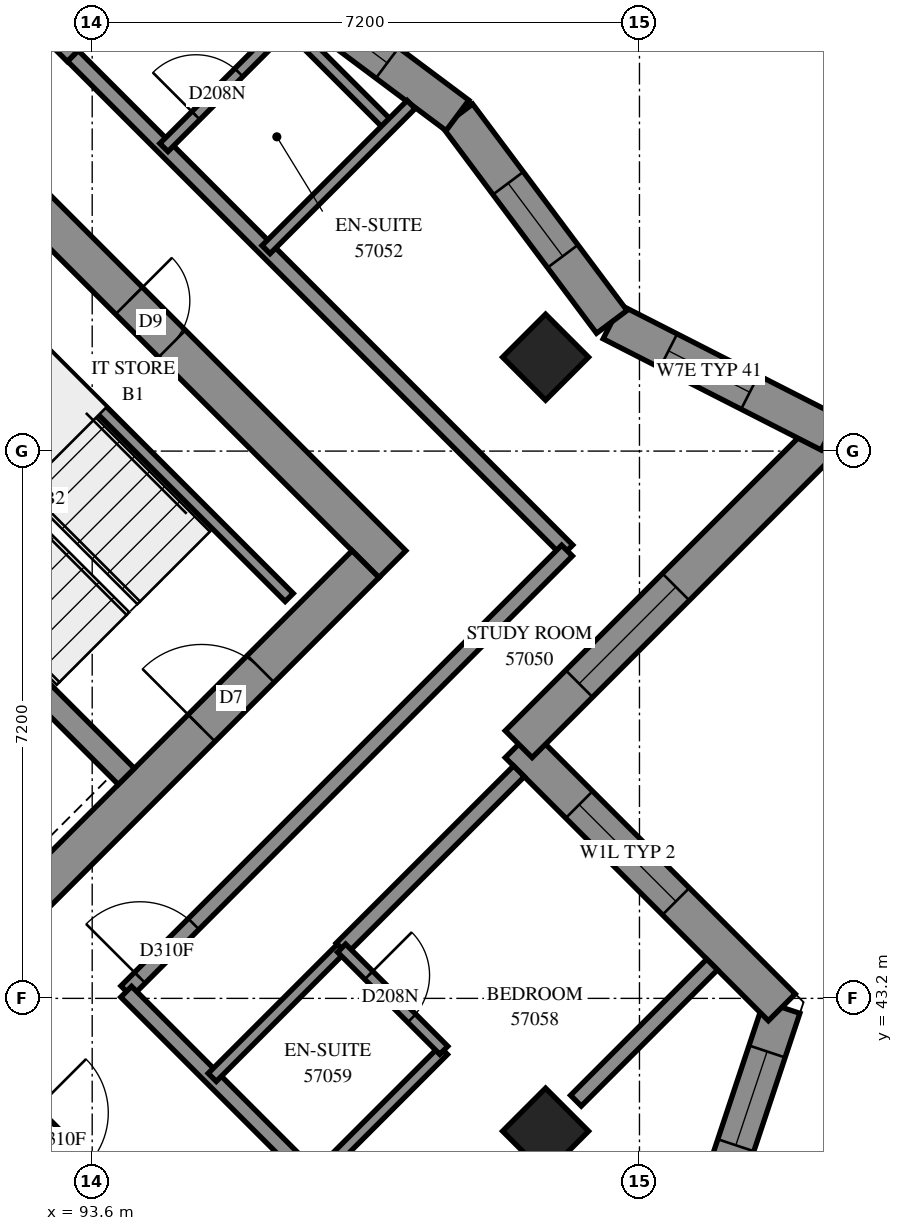
"""IFC4 building model, lengths in metres.
Left out: names, types, materials, properties, quantities, classifications, styles, units other than length and angle.
Written with IfcOpenShell. Run it as: python <this file> out.ifc"""

import sys

from ifc_helpers import new_model, si_unit, direction, frame, frame_2d, origin, origin_2d, place, context, subcontext, project, spatial, polyline, rectangle, outline, extrude, element, fill, save


model = new_model("IFC4")
c1 = context("Model", 3, precision=1e-05, world=origin(), true_north=direction((0.0, 1.0)))
c2 = subcontext(c1, "Body", "Model", "MODEL_VIEW")
j1 = project(units=[si_unit("LENGTHUNIT", "METRE"), si_unit("PLANEANGLEUNIT", "RADIAN")], contexts=[c1])
p1 = place(None, origin())
s1 = spatial("IfcSite", under=j1, at=p1, CompositionType="ELEMENT")
p2 = place(p1, origin())
s2 = spatial("IfcBuilding", under=s1, at=p2, CompositionType="ELEMENT")
p3 = place(p2, frame((0.0, 0.0, 210.0)))
s3 = spatial("IfcBuildingStorey", under=s2, at=p3, CompositionType="ELEMENT", Elevation=210.0)
for number, where, z_axis, x_axis in (
    (1, (99.565, 51.635, 0.0), (0.0, 0.0, 1.0), (0.707, -0.707, 0.0)),
    (2, (99.565, 41.453, 0.0), (0.0, 0.0, 1.0), (0.707, -0.707, 0.0)),
):
    element("IfcColumn", number, at=place(p3, frame(where, z_axis=z_axis, x_axis=x_axis)), inside=s3, PredefinedType="COLUMN", context=c2, shape_type="SweptSolid", body=[
        extrude(rectangle(XDim=0.8, YDim=0.8, at=origin_2d()), origin(), (0.0, 0.0, 1.0), 3.1),
    ])
p4 = place(p3, frame((86.66, 59.802, -0.3), z_axis=(0.0, 0.0, 1.0), x_axis=(0.7071067812, -0.7071067812, 0.0)))
e3 = element("IfcWall", 3, at=p4, inside=s3, PredefinedType="SHEAR", context=c2, shape_type="SweptSolid", body=[
    extrude(rectangle(XDim=15.4, YDim=0.5, at=frame_2d((7.7, 0.0))), origin(), (0.0, 0.0, 1.0), 2.7),
])
p5 = place(p4, frame((10.5, 0.0, 0.3)))
e4 = element("IfcOpeningElement", 4, at=p5, cuts=e3, PredefinedType="OPENING", context=c2, shape_type="SweptSolid", body=[
    extrude(rectangle(XDim=0.8, YDim=2.1, at=frame_2d((0.4, 1.05))), frame((0.0, 0.26, 0.0), z_axis=(0.0, -1.0, 0.0), x_axis=(1.0, 0.0, 0.0)), (0.0, 0.0, 1.0), 0.52),
])
p6 = place(p3, frame((87.013, 38.731, -0.3), z_axis=(0.0, 0.0, 1.0), x_axis=(0.7071067812, 0.7071067812, 0.0)))
e5 = element("IfcWall", 5, at=p6, inside=s3, PredefinedType="SHEAR", context=c2, shape_type="SweptSolid", body=[
    extrude(rectangle(XDim=14.4, YDim=0.5, at=frame_2d((7.2, 0.0))), origin(), (0.0, 0.0, 1.0), 2.7),
])
p7 = place(p6, frame((4.55, 0.0, 0.3)))
e6 = element("IfcOpeningElement", 6, at=p7, cuts=e5, PredefinedType="OPENING", context=c2, shape_type="SweptSolid", body=[
    extrude(rectangle(XDim=1.1, YDim=2.1, at=frame_2d((0.55, 1.05))), frame((0.0, 0.26, 0.0), z_axis=(0.0, -1.0, 0.0), x_axis=(1.0, 0.0, 0.0)), (0.0, 0.0, 1.0), 0.52),
])
p8 = place(p6, frame((11.35, 0.0, 0.3)))
e7 = element("IfcOpeningElement", 7, at=p8, cuts=e5, PredefinedType="OPENING", context=c2, shape_type="SweptSolid", body=[
    extrude(rectangle(XDim=1.1, YDim=2.1, at=frame_2d((0.55, 1.05))), frame((0.0, 0.26, 0.0), z_axis=(0.0, -1.0, 0.0), x_axis=(1.0, 0.0, 0.0)), (0.0, 0.0, 1.0), 0.52),
])
p9 = place(p3, frame((88.958, 51.211, 0.0), z_axis=(0.0, 0.0, 1.0), x_axis=(0.7070998367, -0.7071137256, 0.0)))
e8 = element("IfcWall", 8, at=p9, inside=s3, PredefinedType="SOLIDWALL", context=c2, shape_type="SweptSolid", body=[
    extrude(rectangle(XDim=7.2, YDim=0.3, at=frame_2d((3.6, 0.0))), origin(), (0.0, 0.0, 1.0), 3.1),
])
p10 = place(p3, frame((101.062, 38.252, 0.0), z_axis=(0.0, 0.0, 1.0), x_axis=(0.3162395484, 0.9486793705, 0.0)))
e9 = element("IfcWall", 9, at=p10, inside=s3, PredefinedType="SOLIDWALL", context=c2, shape_type="SweptSolid", body=[
    extrude(outline(polyline([(-0.12, -0.25), (5.247, -0.25), (4.938, 0.25), (0.12, 0.25), (-0.12, -0.25)])), origin(), (0.0, 0.0, 1.0), 3.1),
])
p11 = place(p10, frame((1.68, 0.0, 0.45)))
e10 = element("IfcOpeningElement", 10, at=p11, cuts=e9, PredefinedType="OPENING", context=c2, shape_type="SweptSolid", body=[
    extrude(rectangle(XDim=1.3, YDim=2.5, at=frame_2d((0.65, 1.25))), frame((0.0, 0.26, 0.0), z_axis=(0.0, -1.0, 0.0), x_axis=(1.0, 0.0, 0.0)), (0.0, 0.0, 1.0), 0.52),
])
p12 = place(p10, frame((3.18, 0.0, 0.45)))
e11 = element("IfcOpeningElement", 11, at=p12, cuts=e9, PredefinedType="OPENING", context=c2, shape_type="SweptSolid", body=[
    extrude(rectangle(XDim=1.3, YDim=2.5, at=frame_2d((0.65, 1.25))), frame((0.0, 0.26, 0.0), z_axis=(0.0, -1.0, 0.0), x_axis=(1.0, 0.0, 0.0)), (0.0, 0.0, 1.0), 0.52),
])
p13 = place(p3, frame((102.673, 43.083, 0.0), z_axis=(0.0, 0.0, 1.0), x_axis=(-0.7071067812, 0.7071067812, 0.0)))
e12 = element("IfcWall", 12, at=p13, inside=s3, PredefinedType="SOLIDWALL", context=c2, shape_type="SweptSolid", body=[
    extrude(outline(polyline([(-0.154, -0.25), (4.646, -0.25), (5.146, 0.25), (0.154, 0.25), (-0.154, -0.25)])), origin(), (0.0, 0.0, 1.0), 3.1),
])
p14 = place(p13, frame((1.97, 0.0, 0.6)))
e13 = element("IfcOpeningElement", 13, at=p14, cuts=e12, PredefinedType="OPENING", context=c2, shape_type="SweptSolid", body=[
    extrude(rectangle(XDim=1.8, YDim=1.9, at=frame_2d((0.9, 0.95))), frame((0.0, 0.26, 0.0), z_axis=(0.0, -1.0, 0.0), x_axis=(1.0, 0.0, 0.0)), (0.0, 0.0, 1.0), 0.52),
])
p15 = place(p3, frame((99.211, 46.544, 0.0), z_axis=(0.0, 0.0, 1.0), x_axis=(0.7071067812, 0.7071067812, 0.0)))
e14 = element("IfcWall", 14, at=p15, inside=s3, PredefinedType="SOLIDWALL", context=c2, shape_type="SweptSolid", body=[
    extrude(outline(polyline([(0.25, -0.25), (6.132, -0.25), (5.444, 0.25), (-0.25, 0.25), (0.25, -0.25)])), origin(), (0.0, 0.0, 1.0), 3.1),
])
p16 = place(p15, frame((1.125, 0.0, 0.6)))
e15 = element("IfcOpeningElement", 15, at=p16, cuts=e14, PredefinedType="OPENING", context=c2, shape_type="SweptSolid", body=[
    extrude(rectangle(XDim=1.8, YDim=1.9, at=frame_2d((0.9, 0.95))), frame((0.0, 0.26, 0.0), z_axis=(0.0, -1.0, 0.0), x_axis=(1.0, 0.0, 0.0)), (0.0, 0.0, 1.0), 0.52),
])
p17 = place(p3, frame((103.304, 50.637, 0.0), z_axis=(0.0, 0.0, 1.0), x_axis=(-0.8908334453, 0.4543300262, 0.0)))
e16 = element("IfcWall", 16, at=p17, inside=s3, PredefinedType="SOLIDWALL", context=c2, shape_type="SweptSolid", body=[
    extrude(outline(polyline([(-0.344, -0.25), (3.162, -0.25), (3.278, 0.25), (0.344, 0.25), (-0.344, -0.25)])), origin(), (0.0, 0.0, 1.0), 3.1),
])
p18 = place(p17, frame((1.182, 0.0, 0.45)))
e17 = element("IfcOpeningElement", 17, at=p18, cuts=e16, PredefinedType="OPENING", context=c2, shape_type="SweptSolid", body=[
    extrude(rectangle(XDim=1.2, YDim=2.5, at=frame_2d((0.6, 1.25))), frame((0.0, 0.26, 0.0), z_axis=(0.0, -1.0, 0.0), x_axis=(1.0, 0.0, 0.0)), (0.0, 0.0, 1.0), 0.52),
])
p19 = place(p3, frame((100.436, 52.1, 0.0), z_axis=(0.0, 0.0, 1.0), x_axis=(-0.5986733779, 0.8009932501, 0.0)))
e18 = element("IfcWall", 18, at=p19, inside=s3, PredefinedType="SOLIDWALL", context=c2, shape_type="SweptSolid", body=[
    extrude(outline(polyline([(0.058, -0.25), (3.427, -0.25), (3.355, 0.25), (-0.058, 0.25), (0.058, -0.25)])), origin(), (0.0, 0.0, 1.0), 3.1),
])
p20 = place(p19, frame((1.077, 0.0, 0.45)))
e19 = element("IfcOpeningElement", 19, at=p20, cuts=e18, PredefinedType="OPENING", context=c2, shape_type="SweptSolid", body=[
    extrude(rectangle(XDim=1.2, YDim=2.5, at=frame_2d((0.6, 1.25))), frame((0.0, 0.26, 0.0), z_axis=(0.0, -1.0, 0.0), x_axis=(1.0, 0.0, 0.0)), (0.0, 0.0, 1.0), 0.52),
])
p21 = place(p3, frame((98.405, 54.816, 0.0), z_axis=(0.0, 0.0, 1.0), x_axis=(-0.8009854957, 0.5986837527, 0.0)))
e20 = element("IfcWall", 20, at=p21, inside=s3, PredefinedType="SOLIDWALL", context=c2, shape_type="SweptSolid", body=[
    extrude(outline(polyline([(-0.036, -0.25), (3.333, -0.25), (3.405, 0.25), (0.036, 0.25), (-0.036, -0.25)])), origin(), (0.0, 0.0, 1.0), 3.1),
])
p22 = place(p21, frame((1.153, 0.0, 0.45)))
e21 = element("IfcOpeningElement", 21, at=p22, cuts=e20, PredefinedType="OPENING", context=c2, shape_type="SweptSolid", body=[
    extrude(rectangle(XDim=1.2, YDim=2.5, at=frame_2d((0.6, 1.25))), frame((0.0, 0.26, 0.0), z_axis=(0.0, -1.0, 0.0), x_axis=(1.0, 0.0, 0.0)), (0.0, 0.0, 1.0), 0.52),
])
p23 = place(p3, frame((91.313, 53.354, 0.0), z_axis=(0.0, 0.0, 1.0), x_axis=(0.7071140275, -0.7070995348, 0.0)))
e22 = element("IfcWall", 22, at=p23, inside=s3, PredefinedType="PARTITIONING", context=c2, shape_type="SweptSolid", body=[
    extrude(rectangle(XDim=6.9, YDim=0.15, at=frame_2d((3.45, 0.0))), origin(), (0.0, 0.0, 1.0), 3.1),
])
p24 = place(p3, frame((93.346, 55.599, 0.0), z_axis=(0.0, 0.0, 1.0), x_axis=(0.7071067812, -0.7071067812, 0.0)))
e23 = element("IfcWall", 23, at=p24, inside=s3, PredefinedType="PARTITIONING", context=c2, shape_type="SweptSolid", body=[
    extrude(rectangle(XDim=9.201, YDim=0.2, at=frame_2d((4.601, 0.0))), origin(), (0.0, 0.0, 1.0), 3.1),
])
p25 = place(p3, frame((94.049, 43.293, 0.0), z_axis=(0.0, 0.0, 1.0), x_axis=(0.7071067812, 0.7071067812, 0.0)))
e24 = element("IfcWall", 24, at=p25, inside=s3, PredefinedType="PARTITIONING", context=c2, shape_type="SweptSolid", body=[
    extrude(rectangle(XDim=8.2, YDim=0.2, at=frame_2d((4.1, 0.0))), origin(), (0.0, 0.0, 1.0), 3.1),
])
p26 = place(p25, frame((0.252, 0.0, 0.0)))
e25 = element("IfcOpeningElement", 25, at=p26, cuts=e24, PredefinedType="OPENING", context=c2, shape_type="SweptSolid", body=[
    extrude(rectangle(XDim=1.0, YDim=2.1, at=frame_2d((0.5, 1.05))), frame((0.0, 0.11, 0.0), z_axis=(0.0, -1.0, 0.0), x_axis=(1.0, 0.0, 0.0)), (0.0, 0.0, 1.0), 0.22),
])
p27 = place(p3, frame((94.047, 43.287, 0.0), z_axis=(0.0, 0.0, 1.0), x_axis=(0.7071067812, -0.7071067812, 0.0)))
e26 = element("IfcWall", 26, at=p27, inside=s3, PredefinedType="PARTITIONING", context=c2, shape_type="SweptSolid", body=[
    extrude(rectangle(XDim=5.199, YDim=0.2, at=frame_2d((2.599, 0.0))), origin(), (0.0, 0.0, 1.0), 3.1),
])
p28 = place(p27, frame((3.898, 0.0, 0.0)))
e27 = element("IfcOpeningElement", 27, at=p28, cuts=e26, PredefinedType="OPENING", context=c2, shape_type="SweptSolid", body=[
    extrude(rectangle(XDim=0.9, YDim=2.1, at=frame_2d((0.45, 1.05))), frame((0.0, 0.11, 0.0), z_axis=(0.0, -1.0, 0.0), x_axis=(1.0, 0.0, 0.0)), (0.0, 0.0, 1.0), 0.22),
])
p29 = place(p3, frame((92.633, 41.873, 0.0), z_axis=(0.0, 0.0, 1.0), x_axis=(0.7071067812, -0.7071067812, 0.0)))
e28 = element("IfcWall", 28, at=p29, inside=s3, PredefinedType="PARTITIONING", context=c2, shape_type="SweptSolid", body=[
    extrude(rectangle(XDim=5.199, YDim=0.2, at=frame_2d((2.599, 0.0))), origin(), (0.0, 0.0, 1.0), 3.1),
])
p30 = place(p29, frame((0.253, 0.0, 0.0)))
e29 = element("IfcOpeningElement", 29, at=p30, cuts=e28, PredefinedType="OPENING", context=c2, shape_type="SweptSolid", body=[
    extrude(rectangle(XDim=1.0, YDim=2.1, at=frame_2d((0.5, 1.05))), frame((0.0, 0.11, 0.0), z_axis=(0.0, -1.0, 0.0), x_axis=(1.0, 0.0, 0.0)), (0.0, 0.0, 1.0), 0.22),
])
p31 = place(p29, frame((3.948, 0.0, 0.0)))
e30 = element("IfcOpeningElement", 30, at=p31, cuts=e28, PredefinedType="OPENING", context=c2, shape_type="SweptSolid", body=[
    extrude(rectangle(XDim=0.9, YDim=2.1, at=frame_2d((0.45, 1.05))), frame((0.0, 0.11, 0.0), z_axis=(0.0, -1.0, 0.0), x_axis=(1.0, 0.0, 0.0)), (0.0, 0.0, 1.0), 0.22),
])
p32 = place(p3, frame((96.88, 43.856, 0.0), z_axis=(0.0, 0.0, 1.0), x_axis=(0.7074098182, 0.7068036142, 0.0)))
e31 = element("IfcWall", 31, at=p32, inside=s3, PredefinedType="PARTITIONING", context=c2, shape_type="SweptSolid", body=[
    extrude(rectangle(XDim=3.299, YDim=0.2, at=frame_2d((1.65, 0.0))), origin(), (0.0, 0.0, 1.0), 3.1),
])
p33 = place(p3, frame((95.567, 56.617, 0.0), z_axis=(0.0, 0.0, 1.0), x_axis=(0.7071249683, -0.7070885936, 0.0)))
e32 = element("IfcWall", 32, at=p33, inside=s3, PredefinedType="PARTITIONING", context=c2, shape_type="SweptSolid", body=[
    extrude(rectangle(XDim=2.749, YDim=0.15, at=frame_2d((1.375, 0.0))), origin(), (0.0, 0.0, 1.0), 3.1),
])
p34 = place(p3, frame((95.887, 53.051, 0.0), z_axis=(0.0, 0.0, 1.0), x_axis=(0.7070882582, 0.7071253037, 0.0)))
e33 = element("IfcWall", 33, at=p34, inside=s3, PredefinedType="PARTITIONING", context=c2, shape_type="SweptSolid", body=[
    extrude(rectangle(XDim=2.699, YDim=0.15, at=frame_2d((1.35, 0.0))), origin(), (0.0, 0.0, 1.0), 3.1),
])
p35 = place(p3, frame((99.964, 41.854, 0.0), z_axis=(0.0, 0.0, 1.0), x_axis=(0.7071265121, 0.7070870497, 0.0)))
e34 = element("IfcWall", 34, at=p35, inside=s3, PredefinedType="PARTITIONING", context=c2, shape_type="SweptSolid", body=[
    extrude(rectangle(XDim=2.534, YDim=0.2, at=frame_2d((1.267, 0.0))), origin(), (0.0, 0.0, 1.0), 3.1),
])
for number, where, z_axis, x_axis in (
    (35, (96.523, 40.817, 0.0), (0.0, 0.0, 1.0), (0.707, 0.707, 0.0)),
    (36, (95.179, 42.161, 0.0), (0.0, 0.0, 1.0), (0.707, 0.707, 0.0)),
):
    element("IfcWall", number, at=place(p3, frame(where, z_axis=z_axis, x_axis=x_axis)), inside=s3, PredefinedType="PARTITIONING", context=c2, shape_type="SweptSolid", body=[
        extrude(rectangle(XDim=2.401, YDim=0.15, at=frame_2d((1.201, 0.0))), origin(), (0.0, 0.0, 1.0), 3.1),
    ])
p36 = place(p3, frame((94.544, 54.394, 0.0), z_axis=(0.0, 0.0, 1.0), x_axis=(0.7070861601, 0.7071274017, 0.0)))
e37 = element("IfcWall", 37, at=p36, inside=s3, PredefinedType="PARTITIONING", context=c2, shape_type="SweptSolid", body=[
    extrude(rectangle(XDim=2.425, YDim=0.15, at=frame_2d((1.212, 0.0))), origin(), (0.0, 0.0, 1.0), 3.1),
])
p37 = place(p36, frame((0.594, 0.0, 0.0)))
e38 = element("IfcOpeningElement", 38, at=p37, cuts=e37, PredefinedType="OPENING", context=c2, shape_type="SweptSolid", body=[
    extrude(rectangle(XDim=0.8, YDim=2.1, at=frame_2d((0.4, 1.05))), frame((0.0, 0.085, 0.0), z_axis=(0.0, -1.0, 0.0), x_axis=(1.0, 0.0, 0.0)), (0.0, 0.0, 1.0), 0.17),
])
p38 = place(p3, frame((96.881, 43.861, 0.0), z_axis=(0.0, 0.0, 1.0), x_axis=(0.7071067812, -0.7071067812, 0.0)))
e39 = element("IfcWall", 39, at=p38, inside=s3, PredefinedType="PARTITIONING", context=c2, shape_type="SweptSolid", body=[
    extrude(rectangle(XDim=1.901, YDim=0.15, at=frame_2d((0.95, 0.0))), origin(), (0.0, 0.0, 1.0), 3.1),
])
p39 = place(p38, frame((0.505, 0.0, 0.0)))
e40 = element("IfcOpeningElement", 40, at=p39, cuts=e39, PredefinedType="OPENING", context=c2, shape_type="SweptSolid", body=[
    extrude(rectangle(XDim=0.8, YDim=2.1, at=frame_2d((0.4, 1.05))), frame((0.0, 0.085, 0.0), z_axis=(0.0, -1.0, 0.0), x_axis=(1.0, 0.0, 0.0)), (0.0, 0.0, 1.0), 0.17),
])
p40 = place(p3, frame((92.311, 56.627, 0.0), z_axis=(0.0, 0.0, 1.0), x_axis=(0.7077922938, -0.7064206033, 0.0)))
e41 = element("IfcWall", 41, at=p40, inside=s3, PredefinedType="PARTITIONING", context=c2, shape_type="SweptSolid", body=[
    extrude(rectangle(XDim=1.458, YDim=0.2, at=frame_2d((0.729, 0.0))), origin(), (0.0, 0.0, 1.0), 3.1),
])
p41 = place(p12, origin())
e42 = element("IfcWindow", 42, at=p41, inside=s3, PartitioningType="SINGLE_PANEL", PredefinedType="WINDOW", context=c2, shape_type="SweptSolid", body=[
    extrude(rectangle(XDim=1.3, YDim=2.5, at=frame_2d((0.65, 1.25))), frame((0.0, 0.18, 0.0), z_axis=(0.0, -1.0, 0.0), x_axis=(1.0, 0.0, 0.0)), (0.0, 0.0, 1.0), 0.06),
])
fill(e11, e42)
p42 = place(p14, origin())
e43 = element("IfcWindow", 43, at=p42, inside=s3, PartitioningType="SINGLE_PANEL", PredefinedType="WINDOW", context=c2, shape_type="SweptSolid", body=[
    extrude(rectangle(XDim=1.8, YDim=1.9, at=frame_2d((0.9, 0.95))), frame((0.0, 0.18, 0.0), z_axis=(0.0, -1.0, 0.0), x_axis=(1.0, 0.0, 0.0)), (0.0, 0.0, 1.0), 0.06),
])
fill(e13, e43)
p43 = place(p16, origin())
e44 = element("IfcWindow", 44, at=p43, inside=s3, PartitioningType="SINGLE_PANEL", PredefinedType="WINDOW", context=c2, shape_type="SweptSolid", body=[
    extrude(rectangle(XDim=1.8, YDim=1.9, at=frame_2d((0.9, 0.95))), frame((0.0, 0.18, 0.0), z_axis=(0.0, -1.0, 0.0), x_axis=(1.0, 0.0, 0.0)), (0.0, 0.0, 1.0), 0.06),
])
fill(e15, e44)
p44 = place(p18, origin())
e45 = element("IfcWindow", 45, at=p44, inside=s3, PartitioningType="SINGLE_PANEL", PredefinedType="WINDOW", context=c2, shape_type="SweptSolid", body=[
    extrude(rectangle(XDim=1.2, YDim=2.5, at=frame_2d((0.6, 1.25))), frame((0.0, 0.18, 0.0), z_axis=(0.0, -1.0, 0.0), x_axis=(1.0, 0.0, 0.0)), (0.0, 0.0, 1.0), 0.06),
])
fill(e17, e45)
p45 = place(p20, origin())
e46 = element("IfcWindow", 46, at=p45, inside=s3, PartitioningType="SINGLE_PANEL", PredefinedType="WINDOW", context=c2, shape_type="SweptSolid", body=[
    extrude(rectangle(XDim=1.2, YDim=2.5, at=frame_2d((0.6, 1.25))), frame((0.0, 0.18, 0.0), z_axis=(0.0, -1.0, 0.0), x_axis=(1.0, 0.0, 0.0)), (0.0, 0.0, 1.0), 0.06),
])
fill(e19, e46)
p46 = place(p22, origin())
e47 = element("IfcWindow", 47, at=p46, inside=s3, PartitioningType="SINGLE_PANEL", PredefinedType="WINDOW", context=c2, shape_type="SweptSolid", body=[
    extrude(rectangle(XDim=1.2, YDim=2.5, at=frame_2d((0.6, 1.25))), frame((0.0, 0.18, 0.0), z_axis=(0.0, -1.0, 0.0), x_axis=(1.0, 0.0, 0.0)), (0.0, 0.0, 1.0), 0.06),
])
fill(e21, e47)
p47 = place(p5, origin())
e48 = element("IfcDoor", 48, at=p47, inside=s3, OperationType="SINGLE_SWING_RIGHT", PredefinedType="DOOR", context=c2, shape_type="SweptSolid", body=[
    extrude(rectangle(XDim=0.8, YDim=2.1, at=frame_2d((0.4, 1.05))), frame((0.0, 0.025, 0.0), z_axis=(0.0, -1.0, 0.0), x_axis=(1.0, 0.0, 0.0)), (0.0, 0.0, 1.0), 0.05),
])
fill(e4, e48)
p48 = place(p8, origin())
e49 = element("IfcDoor", 49, at=p48, inside=s3, OperationType="SINGLE_SWING_RIGHT", PredefinedType="DOOR", context=c2, shape_type="SweptSolid", body=[
    extrude(rectangle(XDim=1.1, YDim=2.1, at=frame_2d((0.55, 1.05))), frame((0.0, 0.025, 0.0), z_axis=(0.0, -1.0, 0.0), x_axis=(1.0, 0.0, 0.0)), (0.0, 0.0, 1.0), 0.05),
])
fill(e7, e49)
p49 = place(p26, origin())
e50 = element("IfcDoor", 50, at=p49, inside=s3, OperationType="SINGLE_SWING_RIGHT", PredefinedType="DOOR", context=c2, shape_type="SweptSolid", body=[
    extrude(rectangle(XDim=1.0, YDim=2.1, at=frame_2d((0.5, 1.05))), frame((0.0, 0.025, 0.0), z_axis=(0.0, -1.0, 0.0), x_axis=(1.0, 0.0, 0.0)), (0.0, 0.0, 1.0), 0.05),
])
fill(e25, e50)
p50 = place(p37, origin())
e51 = element("IfcDoor", 51, at=p50, inside=s3, OperationType="SINGLE_SWING_RIGHT", PredefinedType="DOOR", context=c2, shape_type="SweptSolid", body=[
    extrude(rectangle(XDim=0.8, YDim=2.1, at=frame_2d((0.4, 1.05))), frame((0.0, 0.025, 0.0), z_axis=(0.0, -1.0, 0.0), x_axis=(1.0, 0.0, 0.0)), (0.0, 0.0, 1.0), 0.05),
])
fill(e38, e51)
p51 = place(p30, origin())
e52 = element("IfcDoor", 52, at=p51, inside=s3, OperationType="SINGLE_SWING_RIGHT", PredefinedType="DOOR", context=c2, shape_type="SweptSolid", body=[
    extrude(rectangle(XDim=1.0, YDim=2.1, at=frame_2d((0.5, 1.05))), frame((0.0, 0.025, 0.0), z_axis=(0.0, -1.0, 0.0), x_axis=(1.0, 0.0, 0.0)), (0.0, 0.0, 1.0), 0.05),
])
fill(e29, e52)
p52 = place(p39, origin())
e53 = element("IfcDoor", 53, at=p52, inside=s3, OperationType="SINGLE_SWING_RIGHT", PredefinedType="DOOR", context=c2, shape_type="SweptSolid", body=[
    extrude(rectangle(XDim=0.8, YDim=2.1, at=frame_2d((0.4, 1.05))), frame((0.0, 0.025, 0.0), z_axis=(0.0, -1.0, 0.0), x_axis=(1.0, 0.0, 0.0)), (0.0, 0.0, 1.0), 0.05),
])
fill(e40, e53)
save(model, sys.argv[1])
